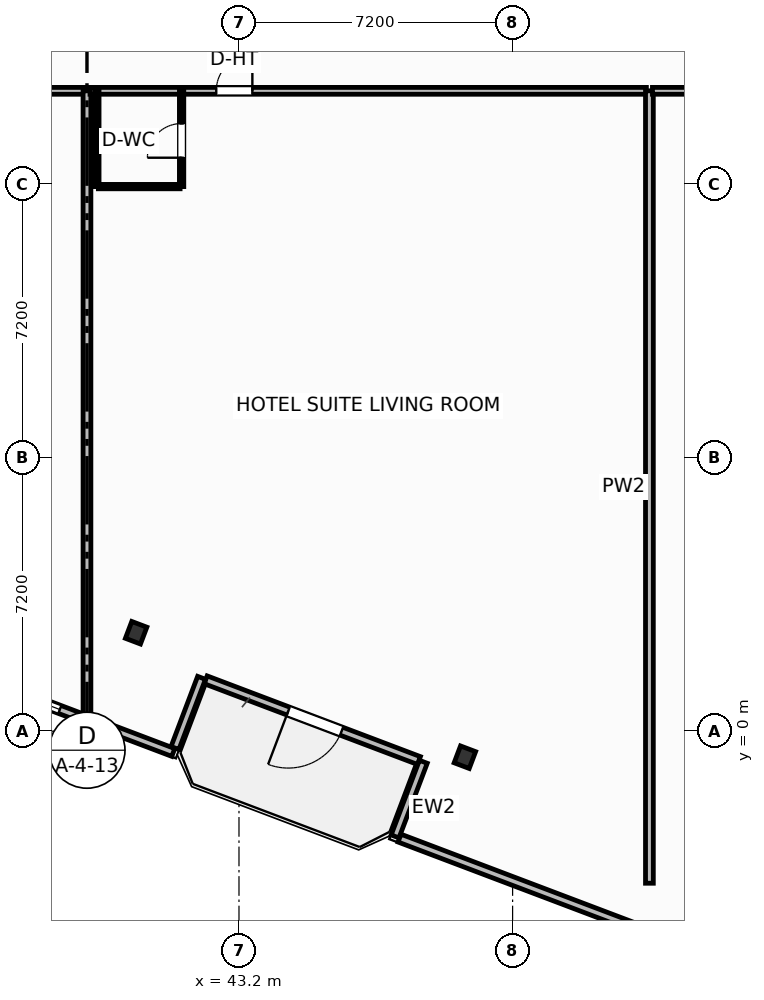
"""IFC4 building model, lengths in metres.
Left out: names, types, materials, properties, quantities, classifications, styles, units other than length and angle.
Written with IfcOpenShell. Run it as: python <this file> out.ifc"""

import sys

from ifc_helpers import new_model, si_unit, direction, frame, frame_2d, origin, origin_2d, place, context, subcontext, project, spatial, rectangle, i_section, extrude, element, fill, save


model = new_model("IFC4")
c1 = context("Model", 3, precision=1e-05, world=origin(), true_north=direction((0.0, 1.0)))
c2 = subcontext(c1, "Body", "Model", "MODEL_VIEW")
j1 = project(units=[si_unit("LENGTHUNIT", "METRE"), si_unit("PLANEANGLEUNIT", "RADIAN")], contexts=[c1])
p1 = place(None, origin())
s1 = spatial("IfcSite", under=j1, at=p1, CompositionType="ELEMENT")
p2 = place(p1, origin())
s2 = spatial("IfcBuilding", under=s1, at=p2, CompositionType="ELEMENT")
p3 = place(p2, frame((0.0, 0.0, 105.8)))
s3 = spatial("IfcBuildingStorey", under=s2, at=p3, CompositionType="ELEMENT", Elevation=105.8)
for number, where, z_axis, x_axis in (
    (1, (40.493, 2.591, 0.0), (0.0, 0.0, 1.0), (0.935, -0.354, 0.0)),
    (2, (49.144, -0.684, 0.0), (0.0, 0.0, 1.0), (0.935, -0.354, 0.0)),
):
    element("IfcColumn", number, at=place(p3, frame(where, z_axis=z_axis, x_axis=x_axis)), inside=s3, PredefinedType="COLUMN", context=c2, shape_type="SweptSolid", body=[
        extrude(i_section(OverallWidth=0.424, OverallDepth=0.474, WebThickness=0.048, FlangeThickness=0.077, FilletRadius=0.025, at=origin_2d()), origin(), (0.0, 0.0, 1.0), 3.7),
    ])
p4 = place(p3, frame((47.935, -0.771, 0.0), z_axis=(0.0, 0.0, 1.0), x_axis=(-0.935227640088, 0.354046976001, 0.0)))
e3 = element("IfcWall", 3, at=p4, inside=s3, PredefinedType="SOLIDWALL", context=c2, shape_type="SweptSolid", body=[
    extrude(rectangle(XDim=6.0, YDim=0.22, at=frame_2d((3.0, 0.0))), origin(), (0.0, 0.0, 1.0), 2.73),
])
p5 = place(p4, frame((2.176, 0.0, 0.0)))
e4 = element("IfcOpeningElement", 4, at=p5, cuts=e3, PredefinedType="OPENING", context=c2, shape_type="SweptSolid", body=[
    extrude(rectangle(XDim=1.5, YDim=2.25, at=frame_2d((0.75, 1.125))), frame((0.0, 0.12, 0.0), z_axis=(0.0, -1.0, 0.0), x_axis=(1.0, 0.0, 0.0)), (0.0, 0.0, 1.0), 0.24),
])
p6 = place(p3, frame((33.957, 2.286, 0.0), z_axis=(0.0, 0.0, 1.0), x_axis=(0.935220736163, -0.354065212427, 0.0)))
e5 = element("IfcWall", 5, at=p6, inside=s3, PredefinedType="SOLIDWALL", context=c2, shape_type="SweptSolid", body=[
    extrude(rectangle(XDim=8.035, YDim=0.22, at=frame_2d((4.018, 0.0))), origin(), (0.0, 0.0, 1.0), 2.73),
])
p7 = place(p6, frame((3.192, 0.0, 0.8)))
e6 = element("IfcOpeningElement", 6, at=p7, cuts=e5, PredefinedType="OPENING", context=c2, shape_type="SweptSolid", body=[
    extrude(rectangle(XDim=1.65, YDim=1.65, at=frame_2d((0.825, 0.825))), frame((0.0, 0.12, 0.0), z_axis=(0.0, -1.0, 0.0), x_axis=(1.0, 0.0, 0.0)), (0.0, 0.0, 1.0), 0.24),
])
p8 = place(p3, frame((41.516, -0.442, 0.0), z_axis=(0.0, 0.0, 1.0), x_axis=(0.354061611705, 0.935222099352, 0.0)))
e7 = element("IfcWall", 7, at=p8, inside=s3, PredefinedType="SOLIDWALL", context=c2, shape_type="SweptSolid", body=[
    extrude(rectangle(XDim=1.975, YDim=0.22, at=frame_2d((0.987, 0.0))), origin(), (0.0, 0.0, 1.0), 2.73),
])
p9 = place(p3, frame((48.051, -0.805, 0.0), z_axis=(0.0, 0.0, 1.0), x_axis=(-0.353988291547, -0.935249854022, 0.0)))
e8 = element("IfcWall", 8, at=p9, inside=s3, PredefinedType="SOLIDWALL", context=c2, shape_type="SweptSolid", body=[
    extrude(rectangle(XDim=2.1, YDim=0.22, at=frame_2d((1.05, 0.0))), origin(), (0.0, 0.0, 1.0), 2.73),
])
p10 = place(p3, frame((47.424, -2.813, 0.0), z_axis=(0.0, 0.0, 1.0), x_axis=(0.935225962032, -0.354051408614, 0.0)))
e9 = element("IfcWall", 9, at=p10, inside=s3, PredefinedType="SOLIDWALL", context=c2, shape_type="SweptSolid", body=[
    extrude(rectangle(XDim=14.347, YDim=0.22, at=frame_2d((7.173, 0.0))), origin(), (0.0, 0.0, 1.0), 2.73),
])
p11 = place(p10, frame((6.348, 0.0, 0.8)))
e10 = element("IfcOpeningElement", 10, at=p11, cuts=e9, PredefinedType="OPENING", context=c2, shape_type="SweptSolid", body=[
    extrude(rectangle(XDim=1.65, YDim=1.65, at=frame_2d((0.825, 0.825))), frame((0.0, 0.12, 0.0), z_axis=(0.0, -1.0, 0.0), x_axis=(1.0, 0.0, 0.0)), (0.0, 0.0, 1.0), 0.24),
])
p12 = place(p3, frame((24.08, 16.85, 0.0), z_axis=(0.0, 0.0, 1.0), x_axis=(1.0, 0.0, 0.0)))
e11 = element("IfcWall", 11, at=p12, inside=s3, PredefinedType="PARTITIONING", context=c2, shape_type="SweptSolid", body=[
    extrude(rectangle(XDim=15.04, YDim=0.18, at=frame_2d((7.52, 0.0))), origin(), (0.0, 0.0, 1.0), 3.45),
])
p13 = place(p12, frame((7.045, 0.0, 0.0)))
e12 = element("IfcOpeningElement", 12, at=p13, cuts=e11, PredefinedType="OPENING", context=c2, shape_type="SweptSolid", body=[
    extrude(rectangle(XDim=0.95, YDim=2.05, at=frame_2d((0.475, 1.025))), frame((0.0, 0.1, 0.0), z_axis=(0.0, -1.0, 0.0), x_axis=(1.0, 0.0, 0.0)), (0.0, 0.0, 1.0), 0.2),
])
p14 = place(p3, frame((39.2, 0.322, 0.0), z_axis=(0.0, 0.0, 1.0), x_axis=(0.0, 1.0, 0.0)))
e13 = element("IfcWall", 13, at=p14, inside=s3, PredefinedType="PARTITIONING", context=c2, shape_type="SweptSolid", body=[
    extrude(rectangle(XDim=16.528, YDim=0.205, at=frame_2d((8.264, 0.0))), origin(), (0.0, 0.0, 1.0), 3.45),
])
p15 = place(p3, frame((39.28, 16.85, 0.0), z_axis=(0.0, 0.0, 1.0), x_axis=(1.0, 0.0, 0.0)))
e14 = element("IfcWall", 14, at=p15, inside=s3, PredefinedType="PARTITIONING", context=c2, shape_type="SweptSolid", body=[
    extrude(rectangle(XDim=14.64, YDim=0.18, at=frame_2d((7.32, 0.0))), origin(), (0.0, 0.0, 1.0), 3.45),
])
p16 = place(p15, frame((3.322, 0.0, 0.0)))
e15 = element("IfcOpeningElement", 15, at=p16, cuts=e14, PredefinedType="OPENING", context=c2, shape_type="SweptSolid", body=[
    extrude(rectangle(XDim=0.95, YDim=2.15, at=frame_2d((0.475, 1.075))), frame((0.0, 0.1, 0.0), z_axis=(0.0, -1.0, 0.0), x_axis=(1.0, 0.0, 0.0)), (0.0, 0.0, 1.0), 0.2),
])
p17 = place(p3, frame((39.5, 14.33, 0.0), z_axis=(0.0, 0.0, 1.0), x_axis=(1.0, 0.0, 0.0)))
e16 = element("IfcWall", 16, at=p17, inside=s3, PredefinedType="PARTITIONING", context=c2, shape_type="SweptSolid", body=[
    extrude(rectangle(XDim=2.15, YDim=0.115, at=frame_2d((1.075, 0.0))), origin(), (0.0, 0.0, 1.0), 3.45),
])
p18 = place(p3, frame((41.69, 14.33, 0.0), z_axis=(0.0, 0.0, 1.0), x_axis=(0.0, 1.0, 0.0)))
e17 = element("IfcWall", 17, at=p18, inside=s3, PredefinedType="PARTITIONING", context=c2, shape_type="SweptSolid", body=[
    extrude(rectangle(XDim=2.52, YDim=0.115, at=frame_2d((1.26, 0.0))), origin(), (0.0, 0.0, 1.0), 3.45),
])
p19 = place(p18, frame((0.76, 0.0, 0.0)))
e18 = element("IfcOpeningElement", 18, at=p19, cuts=e17, PredefinedType="OPENING", context=c2, shape_type="SweptSolid", body=[
    extrude(rectangle(XDim=0.9, YDim=2.05, at=frame_2d((0.45, 1.025))), frame((0.0, 0.067, 0.0), z_axis=(0.0, -1.0, 0.0), x_axis=(1.0, 0.0, 0.0)), (0.0, 0.0, 1.0), 0.135),
])
p20 = place(p3, frame((39.46, 14.33, 0.0), z_axis=(0.0, 0.0, 1.0), x_axis=(0.0, 1.0, 0.0)))
e19 = element("IfcWall", 19, at=p20, inside=s3, PredefinedType="PARTITIONING", context=c2, shape_type="SweptSolid", body=[
    extrude(rectangle(XDim=2.52, YDim=0.115, at=frame_2d((1.26, 0.0))), origin(), (0.0, 0.0, 1.0), 3.45),
])
p21 = place(p3, frame((54.0, -4.0, 0.0), z_axis=(0.0, 0.0, 1.0), x_axis=(0.0, 1.0, 0.0)))
e20 = element("IfcWall", 20, at=p21, inside=s3, PredefinedType="PARTITIONING", context=c2, shape_type="SweptSolid", body=[
    extrude(rectangle(XDim=20.85, YDim=0.205, at=frame_2d((10.425, 0.0))), origin(), (0.0, 0.0, 1.0), 3.45),
])
p22 = place(p3, frame((54.08, 16.85, 0.0), z_axis=(0.0, 0.0, 1.0), x_axis=(1.0, 0.0, 0.0)))
e21 = element("IfcWall", 21, at=p22, inside=s3, PredefinedType="PARTITIONING", context=c2, shape_type="SweptSolid", body=[
    extrude(rectangle(XDim=21.722, YDim=0.18, at=frame_2d((10.861, 0.0))), origin(), (0.0, 0.0, 1.0), 2.58),
])
p23 = place(p22, frame((0.934, 0.0, 0.0)))
e22 = element("IfcOpeningElement", 22, at=p23, cuts=e21, PredefinedType="OPENING", context=c2, shape_type="SweptSolid", body=[
    extrude(rectangle(XDim=0.95, YDim=2.15, at=frame_2d((0.475, 1.075))), frame((0.0, 0.1, 0.0), z_axis=(0.0, -1.0, 0.0), x_axis=(1.0, 0.0, 0.0)), (0.0, 0.0, 1.0), 0.2),
])
p24 = place(p5, origin())
e23 = element("IfcDoor", 23, at=p24, inside=s3, OperationType="SINGLE_SWING_RIGHT", PredefinedType="DOOR", context=c2, shape_type="SweptSolid", body=[
    extrude(rectangle(XDim=1.5, YDim=2.25, at=frame_2d((0.75, 1.125))), frame((0.0, 0.025, 0.0), z_axis=(0.0, -1.0, 0.0), x_axis=(1.0, 0.0, 0.0)), (0.0, 0.0, 1.0), 0.05),
])
fill(e4, e23)
p25 = place(p7, origin())
e24 = element("IfcWindow", 24, at=p25, inside=s3, PartitioningType="SINGLE_PANEL", PredefinedType="WINDOW", context=c2, shape_type="SweptSolid", body=[
    extrude(rectangle(XDim=1.65, YDim=1.65, at=frame_2d((0.825, 0.825))), frame((0.0, 0.03, 0.0), z_axis=(0.0, -1.0, 0.0), x_axis=(1.0, 0.0, 0.0)), (0.0, 0.0, 1.0), 0.06),
])
fill(e6, e24)
p26 = place(p16, origin())
e25 = element("IfcDoor", 25, at=p26, inside=s3, OperationType="SINGLE_SWING_RIGHT", PredefinedType="DOOR", context=c2, shape_type="SweptSolid", body=[
    extrude(rectangle(XDim=0.95, YDim=2.15, at=frame_2d((0.475, 1.075))), frame((0.0, 0.025, 0.0), z_axis=(0.0, -1.0, 0.0), x_axis=(1.0, 0.0, 0.0)), (0.0, 0.0, 1.0), 0.05),
])
fill(e15, e25)
p27 = place(p19, origin())
e26 = element("IfcDoor", 26, at=p27, inside=s3, OperationType="SINGLE_SWING_LEFT", PredefinedType="DOOR", context=c2, shape_type="SweptSolid", body=[
    extrude(rectangle(XDim=0.9, YDim=2.05, at=frame_2d((0.45, 1.025))), frame((0.0, 0.025, 0.0), z_axis=(0.0, -1.0, 0.0), x_axis=(1.0, 0.0, 0.0)), (0.0, 0.0, 1.0), 0.05),
])
fill(e18, e26)
save(model, sys.argv[1])
